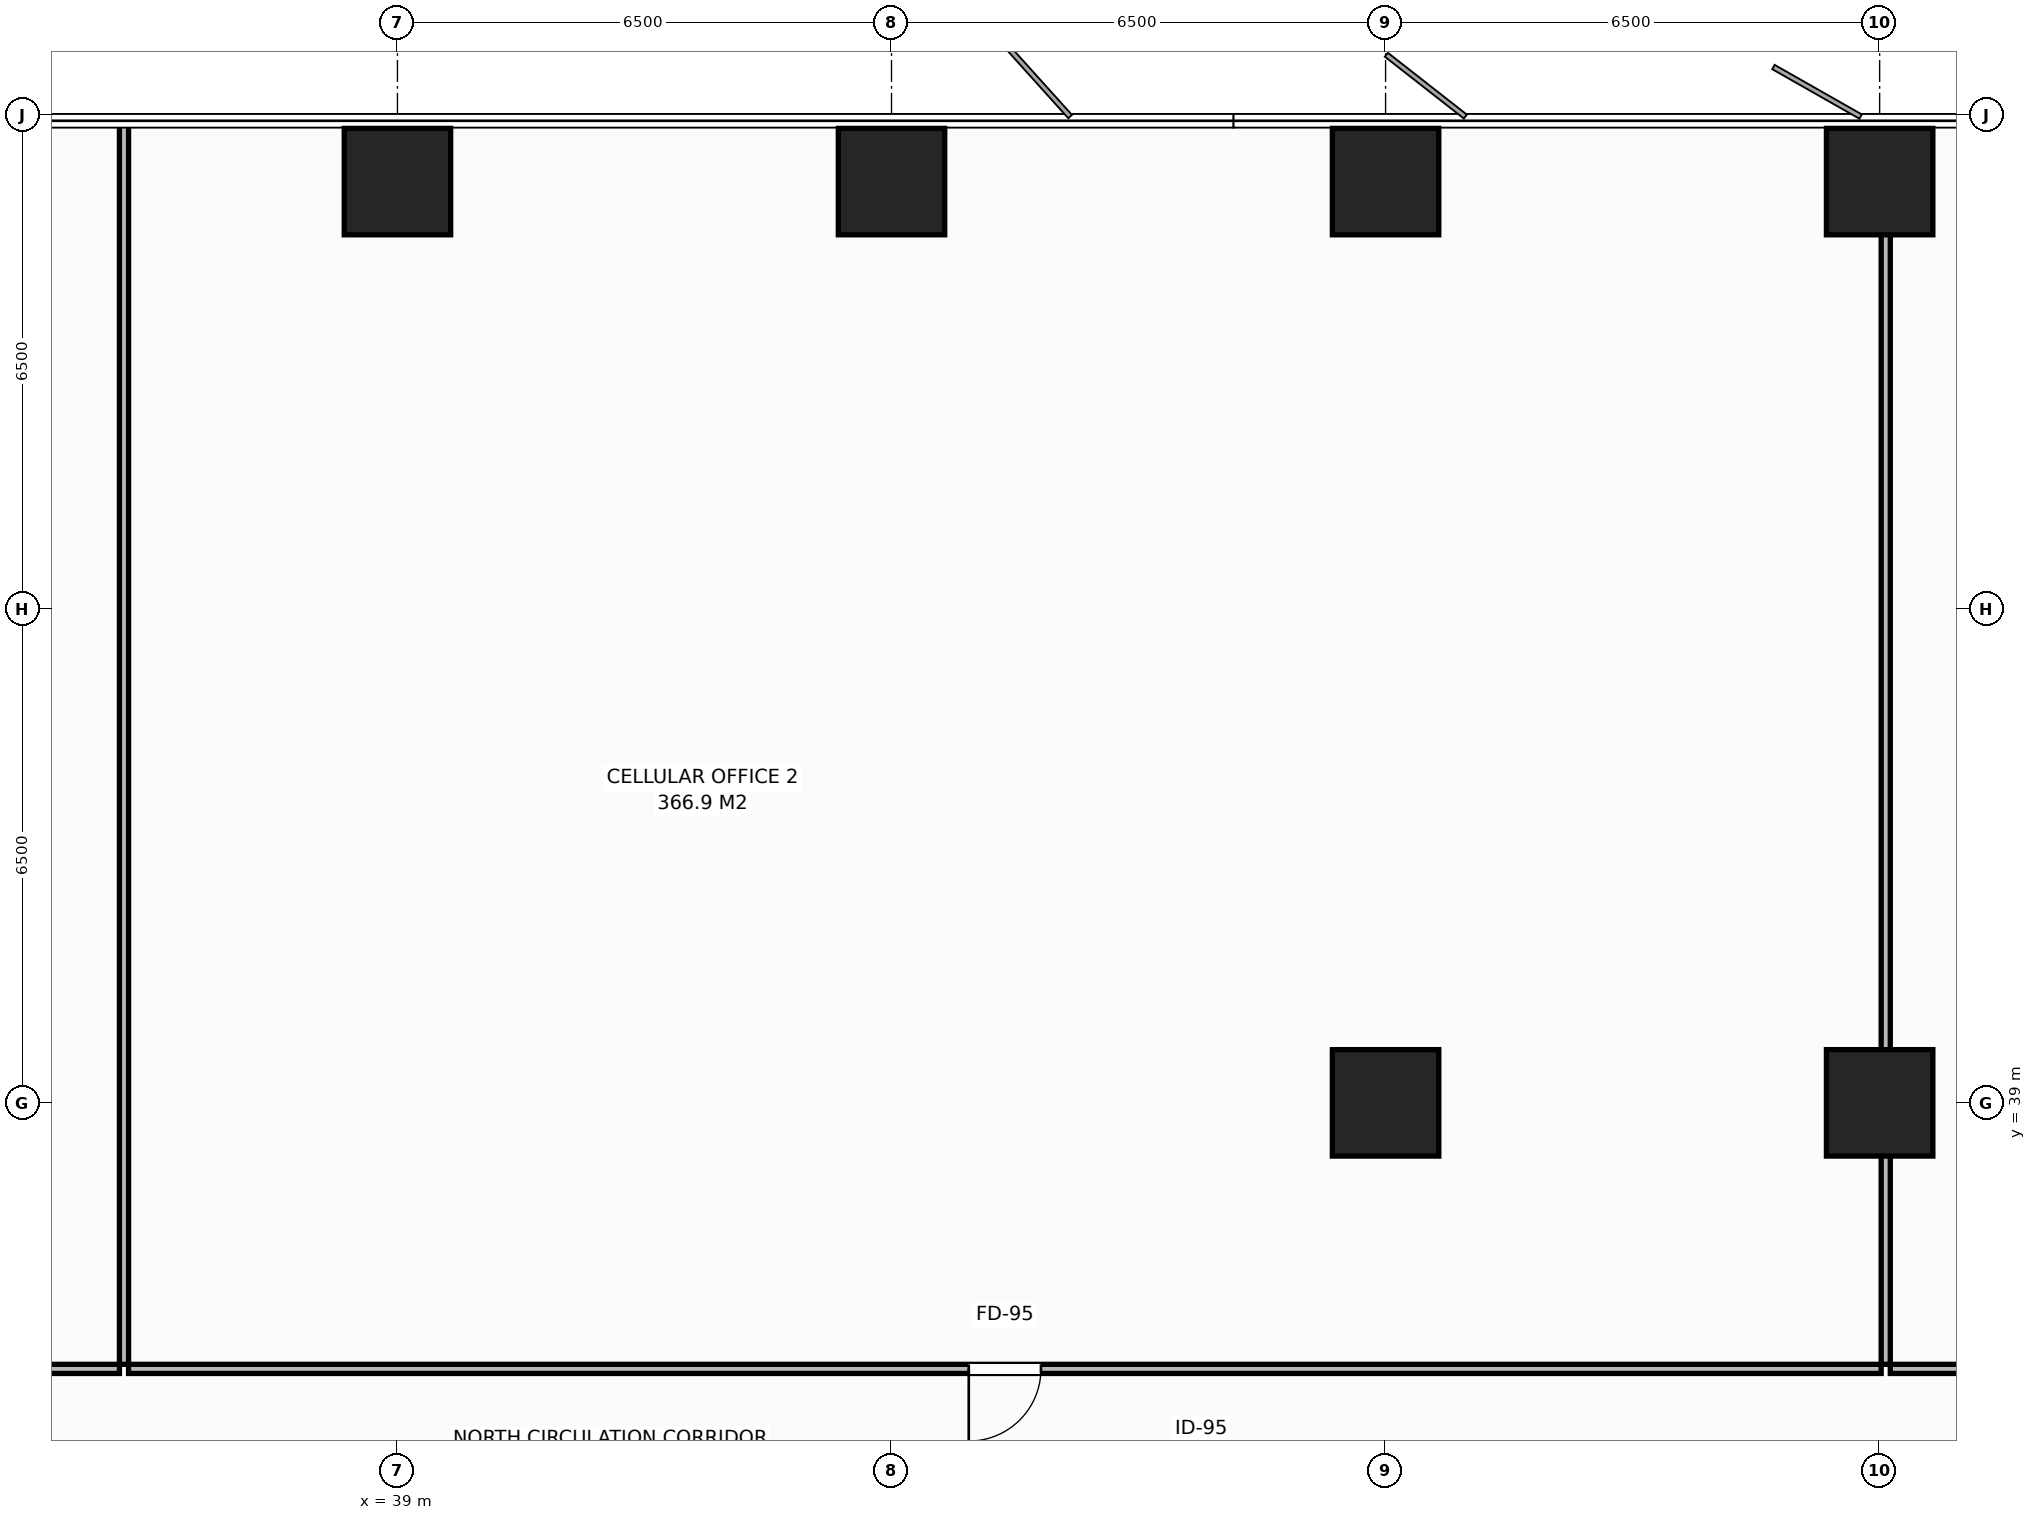
"""IFC4 building model, lengths in metres.
Left out: names, types, materials, properties, quantities, classifications, styles, units other than length and angle.
Written with IfcOpenShell. Run it as: python <this file> out.ifc"""

import sys

from ifc_helpers import new_model, si_unit, direction, frame, frame_2d, origin, origin_2d, place, context, subcontext, project, spatial, rectangle, extrude, element, fill, save


model = new_model("IFC4")
c1 = context("Model", 3, precision=1e-05, world=origin(), true_north=direction((0.0, 1.0)))
c2 = subcontext(c1, "Body", "Model", "MODEL_VIEW")
j1 = project(units=[si_unit("LENGTHUNIT", "METRE"), si_unit("PLANEANGLEUNIT", "RADIAN")], contexts=[c1])
p1 = place(None, origin())
s1 = spatial("IfcSite", under=j1, at=p1, CompositionType="ELEMENT")
p2 = place(p1, origin())
s2 = spatial("IfcBuilding", under=s1, at=p2, CompositionType="ELEMENT")
p3 = place(p2, frame((0.0, 0.0, 39.2)))
s3 = spatial("IfcBuildingStorey", under=s2, at=p3, CompositionType="ELEMENT", Elevation=39.2)
for number, where, z_axis, x_axis in (
    (1, (58.5, 39.0, 0.0), (0.0, 0.0, 1.0), (1.0, 0.0, 0.0)),
    (2, (52.0, 39.0, 0.0), (0.0, 0.0, 1.0), (1.0, 0.0, 0.0)),
    (3, (39.0, 51.12, 0.0), (0.0, 0.0, 1.0), (1.0, 0.0, 0.0)),
    (4, (45.5, 51.12, 0.0), (0.0, 0.0, 1.0), (1.0, 0.0, 0.0)),
    (5, (52.0, 51.12, 0.0), (0.0, 0.0, 1.0), (1.0, 0.0, 0.0)),
    (6, (58.5, 51.12, 0.0), (0.0, 0.0, 1.0), (1.0, 0.0, 0.0)),
):
    element("IfcColumn", number, at=place(p3, frame(where, z_axis=z_axis, x_axis=x_axis)), inside=s3, PredefinedType="COLUMN", context=c2, shape_type="SweptSolid", body=[
        extrude(rectangle(XDim=1.4, YDim=1.4, at=origin_2d()), origin(), (0.0, 0.0, 1.0), 3.8),
    ])
p4 = place(p3, frame((35.402, 35.56, 0.0), z_axis=(0.0, 0.0, 1.0), x_axis=(0.0, 1.0, 0.0)))
e7 = element("IfcWall", 7, at=p4, inside=s3, PredefinedType="PARTITIONING", context=c2, shape_type="SweptSolid", body=[
    extrude(rectangle(XDim=16.42, YDim=0.12, at=frame_2d((8.21, 0.0))), origin(), (0.0, 0.0, 1.0), 3.55),
])
p5 = place(p3, frame((20.487, 35.5, 0.0), z_axis=(0.0, 0.0, 1.0), x_axis=(1.0, 0.0, 0.0)))
e8 = element("IfcWall", 8, at=p5, inside=s3, PredefinedType="PARTITIONING", context=c2, shape_type="SweptSolid", body=[
    extrude(rectangle(XDim=14.856, YDim=0.12, at=frame_2d((7.428, 0.0))), origin(), (0.0, 0.0, 1.0), 3.55),
])
p6 = place(p5, frame((6.953, 0.0, 0.0)))
e9 = element("IfcOpeningElement", 9, at=p6, cuts=e8, PredefinedType="OPENING", context=c2, shape_type="SweptSolid", body=[
    extrude(rectangle(XDim=0.95, YDim=2.15, at=frame_2d((0.475, 1.075))), frame((0.0, 0.07, 0.0), z_axis=(0.0, -1.0, 0.0), x_axis=(1.0, 0.0, 0.0)), (0.0, 0.0, 1.0), 0.14),
])
p7 = place(p3, frame((58.58, 35.56, 0.0), z_axis=(0.0, 0.0, 1.0), x_axis=(0.0, 1.0, 0.0)))
e10 = element("IfcWall", 10, at=p7, inside=s3, PredefinedType="PARTITIONING", context=c2, shape_type="SweptSolid", body=[
    extrude(rectangle(XDim=16.42, YDim=0.12, at=frame_2d((8.21, 0.0))), origin(), (0.0, 0.0, 1.0), 2.9),
])
p8 = place(p3, frame((35.462, 35.5, 0.0), z_axis=(0.0, 0.0, 1.0), x_axis=(1.0, 0.0, 0.0)))
e11 = element("IfcWall", 11, at=p8, inside=s3, PredefinedType="PARTITIONING", context=c2, shape_type="SweptSolid", body=[
    extrude(rectangle(XDim=23.058, YDim=0.12, at=frame_2d((11.529, 0.0))), origin(), (0.0, 0.0, 1.0), 3.55),
])
p9 = place(p8, frame((11.054, 0.0, 0.0)))
e12 = element("IfcOpeningElement", 12, at=p9, cuts=e11, PredefinedType="OPENING", context=c2, shape_type="SweptSolid", body=[
    extrude(rectangle(XDim=0.95, YDim=2.15, at=frame_2d((0.475, 1.075))), frame((0.0, 0.07, 0.0), z_axis=(0.0, -1.0, 0.0), x_axis=(1.0, 0.0, 0.0)), (0.0, 0.0, 1.0), 0.14),
])
p10 = place(p3, frame((58.64, 35.5, 0.0), z_axis=(0.0, 0.0, 1.0), x_axis=(1.0, 0.0, 0.0)))
e13 = element("IfcWall", 13, at=p10, inside=s3, PredefinedType="PARTITIONING", context=c2, shape_type="SweptSolid", body=[
    extrude(rectangle(XDim=19.38, YDim=0.12, at=frame_2d((9.69, 0.0))), origin(), (0.0, 0.0, 1.0), 3.55),
])
p11 = place(p10, frame((4.005, 0.0, 0.0)))
e14 = element("IfcOpeningElement", 14, at=p11, cuts=e13, PredefinedType="OPENING", context=c2, shape_type="SweptSolid", body=[
    extrude(rectangle(XDim=0.95, YDim=2.15, at=frame_2d((0.475, 1.075))), frame((0.0, 0.07, 0.0), z_axis=(0.0, -1.0, 0.0), x_axis=(1.0, 0.0, 0.0)), (0.0, 0.0, 1.0), 0.14),
])
p12 = place(p9, origin())
e15 = element("IfcDoor", 15, at=p12, inside=s3, OperationType="SINGLE_SWING_RIGHT", PredefinedType="DOOR", context=c2, shape_type="SweptSolid", body=[
    extrude(rectangle(XDim=0.95, YDim=2.15, at=frame_2d((0.475, 1.075))), frame((0.0, 0.025, 0.0), z_axis=(0.0, -1.0, 0.0), x_axis=(1.0, 0.0, 0.0)), (0.0, 0.0, 1.0), 0.05),
])
fill(e12, e15)
save(model, sys.argv[1])
